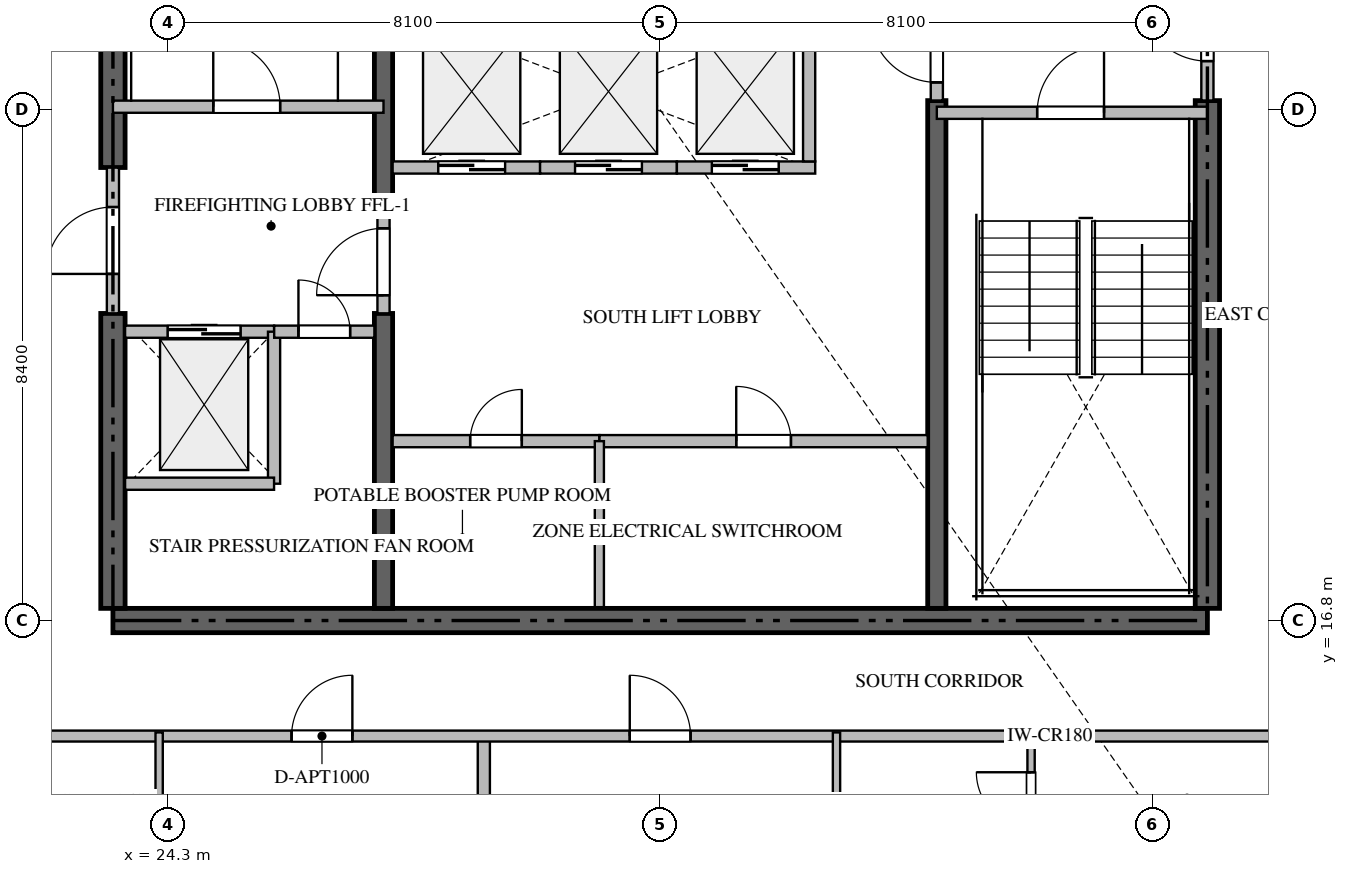
"""IFC4 building model, lengths in metres.
Left out: names, types, materials, properties, quantities, classifications, styles, units other than length and angle.
Written with IfcOpenShell. Run it as: python <this file> out.ifc"""

import sys

from ifc_helpers import new_model, si_unit, direction, frame, frame_2d, origin, place, context, subcontext, project, spatial, rectangle, extrude, source, transform, mapped, element, fill, save


model = new_model("IFC4")
c1 = context("Model", 3, precision=1e-05, world=origin(), true_north=direction((0.0, 1.0)))
c2 = subcontext(c1, "Body", "Model", "MODEL_VIEW")
j1 = project(units=[si_unit("LENGTHUNIT", "METRE"), si_unit("PLANEANGLEUNIT", "RADIAN")], contexts=[c1])
p1 = place(None, origin())
s1 = spatial("IfcSite", under=j1, at=p1, CompositionType="ELEMENT")
p2 = place(p1, origin())
s2 = spatial("IfcBuilding", under=s1, at=p2, CompositionType="ELEMENT")
p3 = place(p2, frame((0.0, 0.0, 142.65)))
s3 = spatial("IfcBuildingStorey", under=s2, at=p3, CompositionType="ELEMENT", Elevation=142.65)
p4 = place(p3, frame((23.4, 16.8, -0.26), z_axis=(0.0, 0.0, 1.0), x_axis=(1.0, 0.0, 0.0)))
e1 = element("IfcWall", 1, at=p4, inside=s3, PredefinedType="SHEAR", context=c2, shape_type="SweptSolid", body=[
    extrude(rectangle(XDim=18.0, YDim=0.4, at=frame_2d((9.0, 0.0))), origin(), (0.0, 0.0, 1.0), 3.748),
])
p5 = place(p3, frame((23.4, 17.0, -0.26), z_axis=(0.0, 0.0, 1.0), x_axis=(0.0, 1.0, 0.0)))
e2 = element("IfcWall", 2, at=p5, inside=s3, PredefinedType="SHEAR", context=c2, shape_type="SweptSolid", body=[
    extrude(rectangle(XDim=4.85, YDim=0.4, at=frame_2d((2.425, 0.0))), origin(), (0.0, 0.0, 1.0), 3.748),
])
p6 = place(p3, frame((23.4, 24.25, -0.26), z_axis=(0.0, 0.0, 1.0), x_axis=(0.0, 1.0, 0.0)))
e3 = element("IfcWall", 3, at=p6, inside=s3, PredefinedType="SHEAR", context=c2, shape_type="SweptSolid", body=[
    extrude(rectangle(XDim=9.15, YDim=0.4, at=frame_2d((4.575, 0.0))), origin(), (0.0, 0.0, 1.0), 3.748),
])
p7 = place(p3, frame((41.4, 17.0, -0.26), z_axis=(0.0, 0.0, 1.0), x_axis=(0.0, 1.0, 0.0)))
e4 = element("IfcWall", 4, at=p7, inside=s3, PredefinedType="SHEAR", context=c2, shape_type="SweptSolid", body=[
    extrude(rectangle(XDim=8.35, YDim=0.4, at=frame_2d((4.175, 0.0))), origin(), (0.0, 0.0, 1.0), 3.748),
])
p8 = place(p3, frame((27.85, 17.0, -0.26), z_axis=(0.0, 0.0, 1.0), x_axis=(0.0, 1.0, 0.0)))
e5 = element("IfcWall", 5, at=p8, inside=s3, PredefinedType="SHEAR", context=c2, shape_type="SweptSolid", body=[
    extrude(rectangle(XDim=4.85, YDim=0.3, at=frame_2d((2.425, 0.0))), origin(), (0.0, 0.0, 1.0), 3.748),
])
p9 = place(p3, frame((27.85, 23.55, -0.26), z_axis=(0.0, 0.0, 1.0), x_axis=(0.0, 1.0, 0.0)))
e6 = element("IfcWall", 6, at=p9, inside=s3, PredefinedType="SHEAR", context=c2, shape_type="SweptSolid", body=[
    extrude(rectangle(XDim=9.85, YDim=0.3, at=frame_2d((4.925, 0.0))), origin(), (0.0, 0.0, 1.0), 3.748),
])
p10 = place(p3, frame((36.95, 17.0, -0.26), z_axis=(0.0, 0.0, 1.0), x_axis=(0.0, 1.0, 0.0)))
e7 = element("IfcWall", 7, at=p10, inside=s3, PredefinedType="SHEAR", context=c2, shape_type="SweptSolid", body=[
    extrude(rectangle(XDim=8.35, YDim=0.3, at=frame_2d((4.175, 0.0))), origin(), (0.0, 0.0, 1.0), 3.748),
])
p11 = place(p3, frame((23.4, 25.25, 0.0), z_axis=(0.0, 0.0, 1.0), x_axis=(1.0, 0.0, 0.0)))
e8 = element("IfcWall", 8, at=p11, inside=s3, PredefinedType="STANDARD", context=c2, shape_type="SweptSolid", body=[
    extrude(rectangle(XDim=4.45, YDim=0.2, at=frame_2d((2.225, 0.0))), origin(), (0.0, 0.0, 1.0), 3.49),
])
p12 = place(p11, frame((1.65, 0.0, 0.0)))
e9 = element("IfcOpeningElement", 9, at=p12, cuts=e8, PredefinedType="OPENING", context=c2, shape_type="SweptSolid", body=[
    extrude(rectangle(XDim=1.1, YDim=2.15, at=frame_2d((0.55, 1.075))), frame((0.0, 0.11, 0.0), z_axis=(0.0, -1.0, 0.0), x_axis=(1.0, 0.0, 0.0)), (0.0, 0.0, 1.0), 0.22),
])
p13 = place(p3, frame((36.95, 25.15, 0.0), z_axis=(0.0, 0.0, 1.0), x_axis=(1.0, 0.0, 0.0)))
e10 = element("IfcWall", 10, at=p13, inside=s3, PredefinedType="STANDARD", context=c2, shape_type="SweptSolid", body=[
    extrude(rectangle(XDim=4.45, YDim=0.2, at=frame_2d((2.225, 0.0))), origin(), (0.0, 0.0, 1.0), 3.49),
])
p14 = place(p13, frame((1.65, 0.0, 0.0)))
e11 = element("IfcOpeningElement", 11, at=p14, cuts=e10, PredefinedType="OPENING", context=c2, shape_type="SweptSolid", body=[
    extrude(rectangle(XDim=1.1, YDim=2.15, at=frame_2d((0.55, 1.075))), frame((0.0, 0.11, 0.0), z_axis=(0.0, -1.0, 0.0), x_axis=(1.0, 0.0, 0.0)), (0.0, 0.0, 1.0), 0.22),
])
p15 = place(p3, frame((23.6, 21.55, 0.0), z_axis=(0.0, 0.0, 1.0), x_axis=(1.0, 0.0, 0.0)))
e12 = element("IfcWall", 12, at=p15, inside=s3, PredefinedType="STANDARD", context=c2, shape_type="SweptSolid", body=[
    extrude(rectangle(XDim=2.45, YDim=0.2, at=frame_2d((1.225, 0.0))), origin(), (0.0, 0.0, 1.0), 3.49),
])
p16 = place(p15, frame((0.7, 0.0, 0.0)))
e13 = element("IfcOpeningElement", 13, at=p16, cuts=e12, PredefinedType="OPENING", context=c2, shape_type="SweptSolid", body=[
    extrude(rectangle(XDim=1.2, YDim=2.2, at=frame_2d((0.6, 1.1))), frame((0.0, 0.11, 0.0), z_axis=(0.0, -1.0, 0.0), x_axis=(1.0, 0.0, 0.0)), (0.0, 0.0, 1.0), 0.22),
])
p17 = place(p3, frame((28.0, 24.25, 0.0), z_axis=(0.0, 0.0, 1.0), x_axis=(1.0, 0.0, 0.0)))
e14 = element("IfcWall", 14, at=p17, inside=s3, PredefinedType="STANDARD", context=c2, shape_type="SweptSolid", body=[
    extrude(rectangle(XDim=2.425, YDim=0.2, at=frame_2d((1.212, 0.0))), origin(), (0.0, 0.0, 1.0), 3.49),
])
p18 = place(p17, frame((0.75, 0.0, 0.0)))
e15 = element("IfcOpeningElement", 15, at=p18, cuts=e14, PredefinedType="OPENING", context=c2, shape_type="SweptSolid", body=[
    extrude(rectangle(XDim=1.1, YDim=2.2, at=frame_2d((0.55, 1.1))), frame((0.0, 0.11, 0.0), z_axis=(0.0, -1.0, 0.0), x_axis=(1.0, 0.0, 0.0)), (0.0, 0.0, 1.0), 0.22),
])
p19 = place(p3, frame((30.425, 24.25, 0.0), z_axis=(0.0, 0.0, 1.0), x_axis=(1.0, 0.0, 0.0)))
e16 = element("IfcWall", 16, at=p19, inside=s3, PredefinedType="STANDARD", context=c2, shape_type="SweptSolid", body=[
    extrude(rectangle(XDim=2.25, YDim=0.2, at=frame_2d((1.125, 0.0))), origin(), (0.0, 0.0, 1.0), 3.49),
])
p20 = place(p19, frame((0.575, 0.0, 0.0)))
e17 = element("IfcOpeningElement", 17, at=p20, cuts=e16, PredefinedType="OPENING", context=c2, shape_type="SweptSolid", body=[
    extrude(rectangle(XDim=1.1, YDim=2.2, at=frame_2d((0.55, 1.1))), frame((0.0, 0.11, 0.0), z_axis=(0.0, -1.0, 0.0), x_axis=(1.0, 0.0, 0.0)), (0.0, 0.0, 1.0), 0.22),
])
p21 = place(p3, frame((32.675, 24.25, 0.0), z_axis=(0.0, 0.0, 1.0), x_axis=(1.0, 0.0, 0.0)))
e18 = element("IfcWall", 18, at=p21, inside=s3, PredefinedType="STANDARD", context=c2, shape_type="SweptSolid", body=[
    extrude(rectangle(XDim=2.275, YDim=0.2, at=frame_2d((1.137, 0.0))), origin(), (0.0, 0.0, 1.0), 3.49),
])
p22 = place(p21, frame((0.575, 0.0, 0.0)))
e19 = element("IfcOpeningElement", 19, at=p22, cuts=e18, PredefinedType="OPENING", context=c2, shape_type="SweptSolid", body=[
    extrude(rectangle(XDim=1.1, YDim=2.2, at=frame_2d((0.55, 1.1))), frame((0.0, 0.11, 0.0), z_axis=(0.0, -1.0, 0.0), x_axis=(1.0, 0.0, 0.0)), (0.0, 0.0, 1.0), 0.22),
])
for number, where, z_axis, x_axis in (
    (20, (34.85, 24.35, 0.0), (0.0, 0.0, 1.0), (0.0, 1.0, 0.0)),
    (21, (26.05, 19.05, 0.0), (0.0, 0.0, 1.0), (0.0, 1.0, 0.0)),
):
    element("IfcWall", number, at=place(p3, frame(where, z_axis=z_axis, x_axis=x_axis)), inside=s3, PredefinedType="STANDARD", context=c2, shape_type="SweptSolid", body=[
        extrude(rectangle(XDim=2.5, YDim=0.2, at=frame_2d((1.25, 0.0))), origin(), (0.0, 0.0, 1.0), 3.49),
    ])
p23 = place(p3, frame((23.6, 19.05, 0.0), z_axis=(0.0, 0.0, 1.0), x_axis=(1.0, 0.0, 0.0)))
e22 = element("IfcWall", 22, at=p23, inside=s3, PredefinedType="STANDARD", context=c2, shape_type="SweptSolid", body=[
    extrude(rectangle(XDim=2.45, YDim=0.2, at=frame_2d((1.225, 0.0))), origin(), (0.0, 0.0, 1.0), 3.49),
])
p24 = place(p3, frame((26.052, 21.55, 0.0), z_axis=(0.0, 0.0, 1.0), x_axis=(1.0, 0.0, 0.0)))
e23 = element("IfcWall", 23, at=p24, inside=s3, PredefinedType="STANDARD", context=c2, shape_type="SweptSolid", body=[
    extrude(rectangle(XDim=1.648, YDim=0.2, at=frame_2d((0.824, 0.0))), origin(), (0.0, 0.0, 1.0), 3.49),
])
p25 = place(p24, frame((0.399, 0.0, 0.0)))
e24 = element("IfcOpeningElement", 24, at=p25, cuts=e23, PredefinedType="OPENING", context=c2, shape_type="SweptSolid", body=[
    extrude(rectangle(XDim=0.85, YDim=2.1, at=frame_2d((0.425, 1.05))), frame((0.0, 0.11, 0.0), z_axis=(0.0, -1.0, 0.0), x_axis=(1.0, 0.0, 0.0)), (0.0, 0.0, 1.0), 0.22),
])
p26 = place(p3, frame((23.4, 21.852, 0.0), z_axis=(0.0, 0.0, 1.0), x_axis=(0.0, 1.0, 0.0)))
e25 = element("IfcWall", 25, at=p26, inside=s3, PredefinedType="STANDARD", context=c2, shape_type="SweptSolid", body=[
    extrude(rectangle(XDim=2.396, YDim=0.2, at=frame_2d((1.198, 0.0))), origin(), (0.0, 0.0, 1.0), 3.49),
])
p27 = place(p26, frame((0.648, 0.0, 0.0)))
e26 = element("IfcOpeningElement", 26, at=p27, cuts=e25, PredefinedType="OPENING", context=c2, shape_type="SweptSolid", body=[
    extrude(rectangle(XDim=1.1, YDim=2.15, at=frame_2d((0.55, 1.075))), frame((0.0, 0.11, 0.0), z_axis=(0.0, -1.0, 0.0), x_axis=(1.0, 0.0, 0.0)), (0.0, 0.0, 1.0), 0.22),
])
p28 = place(p3, frame((41.4, 25.352, 0.0), z_axis=(0.0, 0.0, 1.0), x_axis=(0.0, 1.0, 0.0)))
e27 = element("IfcWall", 27, at=p28, inside=s3, PredefinedType="STANDARD", context=c2, shape_type="SweptSolid", body=[
    extrude(rectangle(XDim=2.396, YDim=0.2, at=frame_2d((1.198, 0.0))), origin(), (0.0, 0.0, 1.0), 3.49),
])
p29 = place(p28, frame((0.648, 0.0, 0.0)))
e28 = element("IfcOpeningElement", 28, at=p29, cuts=e27, PredefinedType="OPENING", context=c2, shape_type="SweptSolid", body=[
    extrude(rectangle(XDim=1.1, YDim=2.15, at=frame_2d((0.55, 1.075))), frame((0.0, 0.11, 0.0), z_axis=(0.0, -1.0, 0.0), x_axis=(1.0, 0.0, 0.0)), (0.0, 0.0, 1.0), 0.22),
])
p30 = place(p3, frame((27.85, 21.852, 0.0), z_axis=(0.0, 0.0, 1.0), x_axis=(0.0, 1.0, 0.0)))
e29 = element("IfcWall", 29, at=p30, inside=s3, PredefinedType="STANDARD", context=c2, shape_type="SweptSolid", body=[
    extrude(rectangle(XDim=1.696, YDim=0.2, at=frame_2d((0.848, 0.0))), origin(), (0.0, 0.0, 1.0), 3.49),
])
p31 = place(p30, frame((0.298, 0.0, 0.0)))
e30 = element("IfcOpeningElement", 30, at=p31, cuts=e29, PredefinedType="OPENING", context=c2, shape_type="SweptSolid", body=[
    extrude(rectangle(XDim=1.1, YDim=2.15, at=frame_2d((0.55, 1.075))), frame((0.0, 0.11, 0.0), z_axis=(0.0, -1.0, 0.0), x_axis=(1.0, 0.0, 0.0)), (0.0, 0.0, 1.0), 0.22),
])
p32 = place(p3, frame((36.95, 25.352, 0.0), z_axis=(0.0, 0.0, 1.0), x_axis=(0.0, 1.0, 0.0)))
e31 = element("IfcWall", 31, at=p32, inside=s3, PredefinedType="STANDARD", context=c2, shape_type="SweptSolid", body=[
    extrude(rectangle(XDim=1.696, YDim=0.2, at=frame_2d((0.848, 0.0))), origin(), (0.0, 0.0, 1.0), 3.49),
])
p33 = place(p32, frame((0.298, 0.0, 0.0)))
e32 = element("IfcOpeningElement", 32, at=p33, cuts=e31, PredefinedType="OPENING", context=c2, shape_type="SweptSolid", body=[
    extrude(rectangle(XDim=1.1, YDim=2.15, at=frame_2d((0.55, 1.075))), frame((0.0, 0.11, 0.0), z_axis=(0.0, -1.0, 0.0), x_axis=(1.0, 0.0, 0.0)), (0.0, 0.0, 1.0), 0.22),
])
p34 = place(p3, frame((28.0, 19.75, 0.0), z_axis=(0.0, 0.0, 1.0), x_axis=(1.0, 0.0, 0.0)))
e33 = element("IfcWall", 33, at=p34, inside=s3, PredefinedType="STANDARD", context=c2, shape_type="SweptSolid", body=[
    extrude(rectangle(XDim=3.4, YDim=0.2, at=frame_2d((1.7, 0.0))), origin(), (0.0, 0.0, 1.0), 3.49),
])
p35 = place(p34, frame((1.275, 0.0, 0.0)))
e34 = element("IfcOpeningElement", 34, at=p35, cuts=e33, PredefinedType="OPENING", context=c2, shape_type="SweptSolid", body=[
    extrude(rectangle(XDim=0.85, YDim=2.1, at=frame_2d((0.425, 1.05))), frame((0.0, 0.11, 0.0), z_axis=(0.0, -1.0, 0.0), x_axis=(1.0, 0.0, 0.0)), (0.0, 0.0, 1.0), 0.22),
])
p36 = place(p3, frame((31.402, 19.75, 0.0), z_axis=(0.0, 0.0, 1.0), x_axis=(1.0, 0.0, 0.0)))
e35 = element("IfcWall", 35, at=p36, inside=s3, PredefinedType="STANDARD", context=c2, shape_type="SweptSolid", body=[
    extrude(rectangle(XDim=5.398, YDim=0.2, at=frame_2d((2.699, 0.0))), origin(), (0.0, 0.0, 1.0), 3.49),
])
p37 = place(p36, frame((2.249, 0.0, 0.0)))
e36 = element("IfcOpeningElement", 36, at=p37, cuts=e35, PredefinedType="OPENING", context=c2, shape_type="SweptSolid", body=[
    extrude(rectangle(XDim=0.9, YDim=2.1, at=frame_2d((0.45, 1.05))), frame((0.0, 0.11, 0.0), z_axis=(0.0, -1.0, 0.0), x_axis=(1.0, 0.0, 0.0)), (0.0, 0.0, 1.0), 0.22),
])
p38 = place(p3, frame((31.4, 17.02, 0.0), z_axis=(0.0, 0.0, 1.0), x_axis=(0.0, 1.0, 0.0)))
e37 = element("IfcWall", 37, at=p38, inside=s3, PredefinedType="PARTITIONING", context=c2, shape_type="SweptSolid", body=[
    extrude(rectangle(XDim=2.73, YDim=0.15, at=frame_2d((1.365, 0.0))), origin(), (0.0, 0.0, 1.0), 3.49),
])
p39 = place(p3, frame((29.5, 1.482, 0.0), z_axis=(0.0, 0.0, 1.0), x_axis=(0.0, 1.0, 0.0)))
e38 = element("IfcWall", 38, at=p39, inside=s3, PredefinedType="PARTITIONING", context=c2, shape_type="SweptSolid", body=[
    extrude(rectangle(XDim=13.418, YDim=0.2, at=frame_2d((6.709, 0.0))), origin(), (0.0, 0.0, 1.0), 3.49),
])
p40 = place(p3, frame((20.952, 14.9, 0.0), z_axis=(0.0, 0.0, 1.0), x_axis=(1.0, 0.0, 0.0)))
e39 = element("IfcWall", 39, at=p40, inside=s3, PredefinedType="PARTITIONING", context=c2, shape_type="SweptSolid", body=[
    extrude(rectangle(XDim=22.896, YDim=0.18, at=frame_2d((11.448, 0.0))), origin(), (0.0, 0.0, 1.0), 3.49),
])
p41 = place(p40, frame((5.386, 0.0, 0.0)))
e40 = element("IfcOpeningElement", 40, at=p41, cuts=e39, PredefinedType="OPENING", context=c2, shape_type="SweptSolid", body=[
    extrude(rectangle(XDim=1.0, YDim=2.15, at=frame_2d((0.5, 1.075))), frame((0.0, 0.1, 0.0), z_axis=(0.0, -1.0, 0.0), x_axis=(1.0, 0.0, 0.0)), (0.0, 0.0, 1.0), 0.2),
])
p42 = place(p40, frame((10.948, 0.0, 0.0)))
e41 = element("IfcOpeningElement", 41, at=p42, cuts=e39, PredefinedType="OPENING", context=c2, shape_type="SweptSolid", body=[
    extrude(rectangle(XDim=1.0, YDim=2.15, at=frame_2d((0.5, 1.075))), frame((0.0, 0.1, 0.0), z_axis=(0.0, -1.0, 0.0), x_axis=(1.0, 0.0, 0.0)), (0.0, 0.0, 1.0), 0.2),
])
for number, where, z_axis, x_axis in (
    (42, (24.16, 12.15, 0.0), (0.0, 0.0, 1.0), (0.0, 1.0, 0.0)),
    (43, (35.3, 12.15, 0.0), (0.0, 0.0, 1.0), (0.0, 1.0, 0.0)),
):
    element("IfcWall", number, at=place(p3, frame(where, z_axis=z_axis, x_axis=x_axis)), inside=s3, PredefinedType="PARTITIONING", context=c2, shape_type="SweptSolid", body=[
        extrude(rectangle(XDim=2.81, YDim=0.12, at=frame_2d((1.405, 0.0))), origin(), (0.0, 0.0, 1.0), 3.49),
    ])
p43 = place(p3, frame((38.5, 12.75, 0.0), z_axis=(0.0, 0.0, 1.0), x_axis=(0.0, 1.0, 0.0)))
e44 = element("IfcWall", 44, at=p43, inside=s3, PredefinedType="PARTITIONING", context=c2, shape_type="SweptSolid", body=[
    extrude(rectangle(XDim=2.21, YDim=0.12, at=frame_2d((1.105, 0.0))), origin(), (0.0, 0.0, 1.0), 3.49),
])
p44 = place(p43, frame((0.655, 0.0, 0.0)))
e45 = element("IfcOpeningElement", 45, at=p44, cuts=e44, PredefinedType="OPENING", context=c2, shape_type="SweptSolid", body=[
    extrude(rectangle(XDim=0.9, YDim=2.1, at=frame_2d((0.45, 1.05))), frame((0.0, 0.07, 0.0), z_axis=(0.0, -1.0, 0.0), x_axis=(1.0, 0.0, 0.0)), (0.0, 0.0, 1.0), 0.14),
])
m1 = source(origin(), c2, "Body", "SweptSolid", [
    extrude(rectangle(XDim=1.1, YDim=2.15, at=frame_2d((0.55, 1.075))), frame((0.0, 0.025, 0.0), z_axis=(0.0, -1.0, 0.0), x_axis=(1.0, 0.0, 0.0)), (0.0, 0.0, 1.0), 0.05),
])
p45 = place(p12, origin())
e46 = element("IfcDoor", 46, at=p45, inside=s3, OperationType="SINGLE_SWING_LEFT", PredefinedType="DOOR", context=c2, shape_type="MappedRepresentation", body=[
    mapped(m1, transform((0.0, 0.0, 0.0), scale=1.0)),
])
fill(e9, e46)
p46 = place(p14, origin())
e47 = element("IfcDoor", 47, at=p46, inside=s3, OperationType="SINGLE_SWING_RIGHT", PredefinedType="DOOR", context=c2, shape_type="MappedRepresentation", body=[
    mapped(m1, transform((0.0, 0.0, 0.0), scale=1.0)),
])
fill(e11, e47)
m2 = source(origin(), c2, "Body", "SweptSolid", [
    extrude(rectangle(XDim=1.2, YDim=2.2, at=frame_2d((0.6, 1.1))), frame((0.0, 0.025, 0.0), z_axis=(0.0, -1.0, 0.0), x_axis=(1.0, 0.0, 0.0)), (0.0, 0.0, 1.0), 0.05),
])
p47 = place(p16, origin())
e48 = element("IfcDoor", 48, at=p47, inside=s3, OperationType="DOUBLE_DOOR_SLIDING", PredefinedType="DOOR", context=c2, shape_type="MappedRepresentation", body=[
    mapped(m2, transform((0.0, 0.0, 0.0), scale=1.0)),
])
fill(e13, e48)
m3 = source(origin(), c2, "Body", "SweptSolid", [
    extrude(rectangle(XDim=1.1, YDim=2.2, at=frame_2d((0.55, 1.1))), frame((0.0, 0.025, 0.0), z_axis=(0.0, -1.0, 0.0), x_axis=(1.0, 0.0, 0.0)), (0.0, 0.0, 1.0), 0.05),
])
p48 = place(p18, origin())
e49 = element("IfcDoor", 49, at=p48, inside=s3, OperationType="DOUBLE_DOOR_SLIDING", PredefinedType="DOOR", context=c2, shape_type="MappedRepresentation", body=[
    mapped(m3, transform((0.0, 0.0, 0.0), scale=1.0)),
])
fill(e15, e49)
p49 = place(p20, origin())
e50 = element("IfcDoor", 50, at=p49, inside=s3, OperationType="DOUBLE_DOOR_SLIDING", PredefinedType="DOOR", context=c2, shape_type="MappedRepresentation", body=[
    mapped(m3, transform((0.0, 0.0, 0.0), scale=1.0)),
])
fill(e17, e50)
p50 = place(p22, origin())
e51 = element("IfcDoor", 51, at=p50, inside=s3, OperationType="DOUBLE_DOOR_SLIDING", PredefinedType="DOOR", context=c2, shape_type="MappedRepresentation", body=[
    mapped(m3, transform((0.0, 0.0, 0.0), scale=1.0)),
])
fill(e19, e51)
m4 = source(origin(), c2, "Body", "SweptSolid", [
    extrude(rectangle(XDim=0.85, YDim=2.1, at=frame_2d((0.425, 1.05))), frame((0.0, 0.025, 0.0), z_axis=(0.0, -1.0, 0.0), x_axis=(1.0, 0.0, 0.0)), (0.0, 0.0, 1.0), 0.05),
])
p51 = place(p25, origin())
e52 = element("IfcDoor", 52, at=p51, inside=s3, OperationType="SINGLE_SWING_LEFT", PredefinedType="DOOR", context=c2, shape_type="MappedRepresentation", body=[
    mapped(m4, transform((0.0, 0.0, 0.0), scale=1.0)),
])
fill(e24, e52)
p52 = place(p27, origin())
e53 = element("IfcDoor", 53, at=p52, inside=s3, OperationType="SINGLE_SWING_LEFT", PredefinedType="DOOR", context=c2, shape_type="MappedRepresentation", body=[
    mapped(m1, transform((0.0, 0.0, 0.0), scale=1.0)),
])
fill(e26, e53)
p53 = place(p29, origin())
e54 = element("IfcDoor", 54, at=p53, inside=s3, OperationType="SINGLE_SWING_RIGHT", PredefinedType="DOOR", context=c2, shape_type="MappedRepresentation", body=[
    mapped(m1, transform((0.0, 0.0, 0.0), scale=1.0)),
])
fill(e28, e54)
p54 = place(p31, origin())
e55 = element("IfcDoor", 55, at=p54, inside=s3, OperationType="SINGLE_SWING_LEFT", PredefinedType="DOOR", context=c2, shape_type="MappedRepresentation", body=[
    mapped(m1, transform((0.0, 0.0, 0.0), scale=1.0)),
])
fill(e30, e55)
p55 = place(p33, origin())
e56 = element("IfcDoor", 56, at=p55, inside=s3, OperationType="SINGLE_SWING_RIGHT", PredefinedType="DOOR", context=c2, shape_type="MappedRepresentation", body=[
    mapped(m1, transform((0.0, 0.0, 0.0), scale=1.0)),
])
fill(e32, e56)
p56 = place(p35, origin())
e57 = element("IfcDoor", 57, at=p56, inside=s3, OperationType="SINGLE_SWING_RIGHT", PredefinedType="DOOR", context=c2, shape_type="MappedRepresentation", body=[
    mapped(m4, transform((0.0, 0.0, 0.0), scale=1.0)),
])
fill(e34, e57)
m5 = source(origin(), c2, "Body", "SweptSolid", [
    extrude(rectangle(XDim=0.9, YDim=2.1, at=frame_2d((0.45, 1.05))), frame((0.0, 0.025, 0.0), z_axis=(0.0, -1.0, 0.0), x_axis=(1.0, 0.0, 0.0)), (0.0, 0.0, 1.0), 0.05),
])
p57 = place(p37, origin())
e58 = element("IfcDoor", 58, at=p57, inside=s3, OperationType="SINGLE_SWING_LEFT", PredefinedType="DOOR", context=c2, shape_type="MappedRepresentation", body=[
    mapped(m5, transform((0.0, 0.0, 0.0), scale=1.0)),
])
fill(e36, e58)
m6 = source(origin(), c2, "Body", "SweptSolid", [
    extrude(rectangle(XDim=1.0, YDim=2.15, at=frame_2d((0.5, 1.075))), frame((0.0, 0.025, 0.0), z_axis=(0.0, -1.0, 0.0), x_axis=(1.0, 0.0, 0.0)), (0.0, 0.0, 1.0), 0.05),
])
p58 = place(p41, origin())
e59 = element("IfcDoor", 59, at=p58, inside=s3, OperationType="SINGLE_SWING_RIGHT", PredefinedType="DOOR", context=c2, shape_type="MappedRepresentation", body=[
    mapped(m6, transform((0.0, 0.0, 0.0), scale=1.0)),
])
fill(e40, e59)
p59 = place(p42, origin())
e60 = element("IfcDoor", 60, at=p59, inside=s3, OperationType="SINGLE_SWING_LEFT", PredefinedType="DOOR", context=c2, shape_type="MappedRepresentation", body=[
    mapped(m6, transform((0.0, 0.0, 0.0), scale=1.0)),
])
fill(e41, e60)
p60 = place(p44, origin())
e61 = element("IfcDoor", 61, at=p60, inside=s3, OperationType="SINGLE_SWING_RIGHT", PredefinedType="DOOR", context=c2, shape_type="MappedRepresentation", body=[
    mapped(m5, transform((0.0, 0.0, 0.0), scale=1.0)),
])
fill(e45, e61)
save(model, sys.argv[1])
